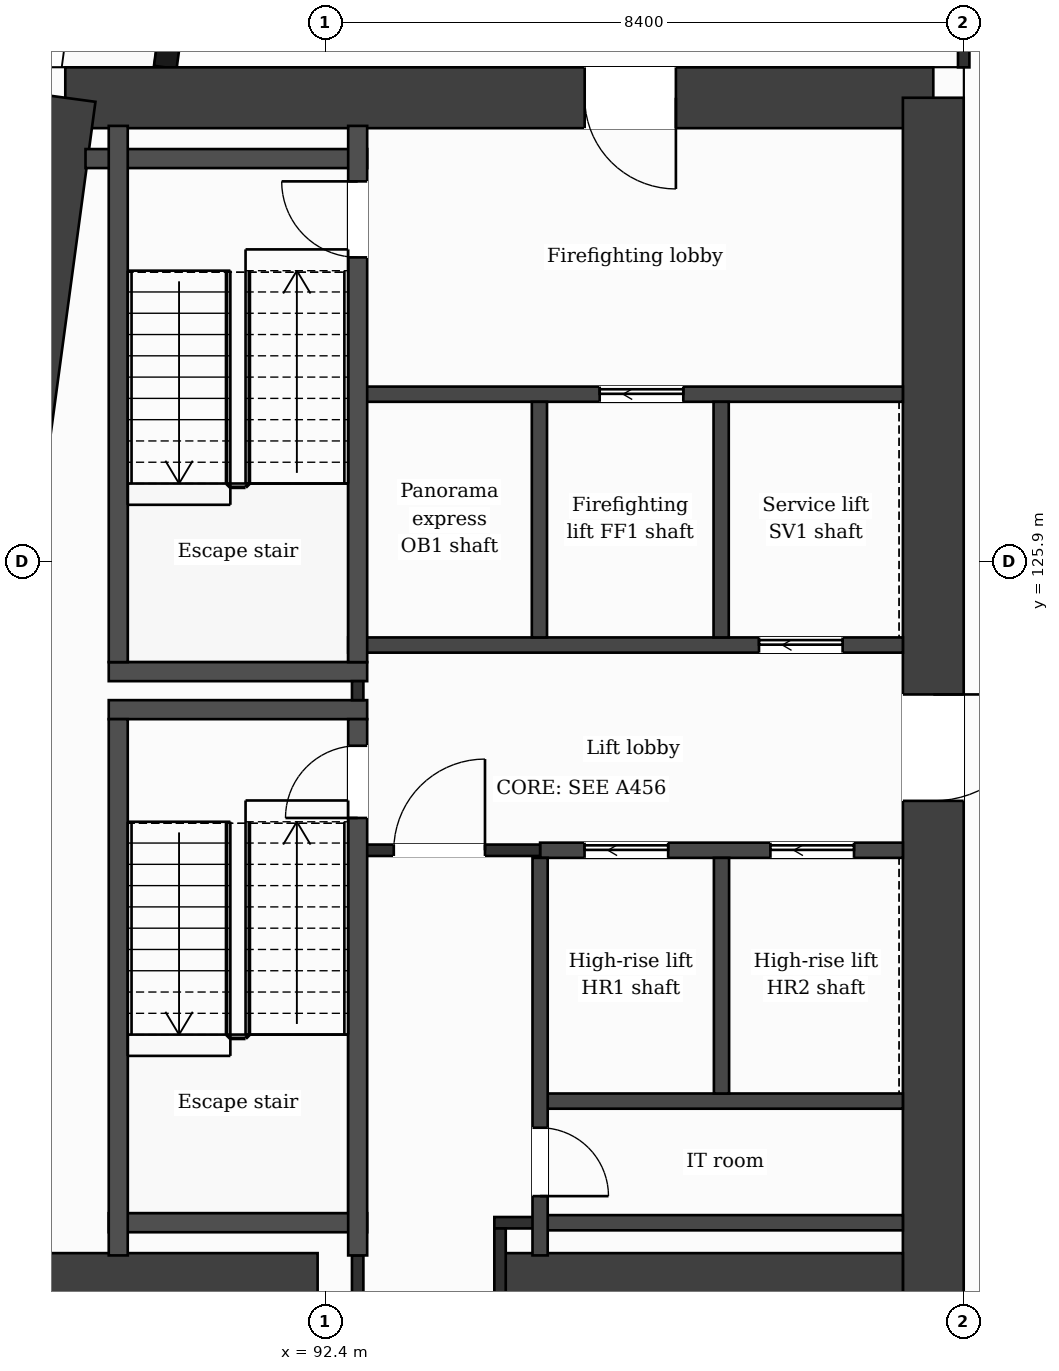
"""IFC4 building model, lengths in metres.
Left out: names, types, materials, properties, quantities, classifications, styles, units other than length and angle.
Written with IfcOpenShell. Run it as: python <this file> out.ifc"""

import sys

from ifc_helpers import new_model, si_unit, direction, frame, frame_2d, origin, place, context, subcontext, project, spatial, rectangle, extrude, element, fill, save


model = new_model("IFC4")
c1 = context("Model", 3, precision=1e-05, world=origin(), true_north=direction((0.0, 1.0)))
c2 = subcontext(c1, "Body", "Model", "MODEL_VIEW")
j1 = project(units=[si_unit("LENGTHUNIT", "METRE"), si_unit("PLANEANGLEUNIT", "RADIAN")], contexts=[c1])
p1 = place(None, origin())
s1 = spatial("IfcSite", under=j1, at=p1, CompositionType="ELEMENT")
p2 = place(p1, origin())
s2 = spatial("IfcBuilding", under=s1, at=p2, CompositionType="ELEMENT")
p3 = place(p2, frame((0.0, 0.0, 228.1)))
s3 = spatial("IfcBuildingStorey", under=s2, at=p3, CompositionType="ELEMENT", Elevation=228.1)
p4 = place(p3, frame((88.98, 132.0, 0.0), z_axis=(0.0, 0.0, 1.0), x_axis=(1.0, 0.0, 0.0)))
e1 = element("IfcWall", 1, at=p4, inside=s3, PredefinedType="SHEAR", context=c2, shape_type="SweptSolid", body=[
    extrude(rectangle(XDim=11.419, YDim=0.8, at=frame_2d((5.71, 0.0))), origin(), (0.0, 0.0, 1.0), 3.7),
])
p5 = place(p4, frame((6.833, 0.0, 0.0)))
e2 = element("IfcOpeningElement", 2, at=p5, cuts=e1, PredefinedType="OPENING", context=c2, shape_type="SweptSolid", body=[
    extrude(rectangle(XDim=1.2, YDim=2.1, at=frame_2d((0.6, 1.05))), frame((0.0, 0.41, 0.0), z_axis=(0.0, -1.0, 0.0), x_axis=(1.0, 0.0, 0.0)), (0.0, 0.0, 1.0), 0.82),
])
p6 = place(p3, frame((100.4, 132.0, 0.0), z_axis=(0.0, 0.0, 1.0), x_axis=(0.0, -1.0, 0.0)))
e3 = element("IfcWall", 3, at=p6, inside=s3, PredefinedType="SHEAR", context=c2, shape_type="SweptSolid", body=[
    extrude(rectangle(XDim=21.2, YDim=0.8, at=frame_2d((10.6, 0.0))), origin(), (0.0, 0.0, 1.0), 3.7),
])
p7 = place(p6, frame((7.85, 0.0, 0.0)))
e4 = element("IfcOpeningElement", 4, at=p7, cuts=e3, PredefinedType="OPENING", context=c2, shape_type="SweptSolid", body=[
    extrude(rectangle(XDim=1.4, YDim=2.1, at=frame_2d((0.7, 1.05))), frame((0.0, 0.41, 0.0), z_axis=(0.0, -1.0, 0.0), x_axis=(1.0, 0.0, 0.0)), (0.0, 0.0, 1.0), 0.82),
])
p8 = place(p3, frame((86.127, 110.8, 0.0), z_axis=(0.0, 0.0, 1.0), x_axis=(0.133408347329, 0.991061154956, 0.0)))
e5 = element("IfcWall", 5, at=p8, inside=s3, PredefinedType="SHEAR", context=c2, shape_type="SweptSolid", body=[
    extrude(rectangle(XDim=21.391, YDim=0.8, at=frame_2d((10.696, 0.0))), origin(), (0.0, 0.0, 1.0), 3.7),
])
p9 = place(p3, frame((87.223, 116.4, 0.0), z_axis=(0.0, 0.0, 1.0), x_axis=(1.0, 0.0, 0.0)))
e6 = element("IfcWall", 6, at=p9, inside=s3, PredefinedType="SHEAR", context=c2, shape_type="SweptSolid", body=[
    extrude(rectangle(XDim=5.077, YDim=0.8, at=frame_2d((2.539, 0.0))), origin(), (0.0, 0.0, 1.0), 3.7),
])
p10 = place(p3, frame((94.7, 116.4, 0.0), z_axis=(0.0, 0.0, 1.0), x_axis=(1.0, 0.0, 0.0)))
e7 = element("IfcWall", 7, at=p10, inside=s3, PredefinedType="SHEAR", context=c2, shape_type="SweptSolid", body=[
    extrude(rectangle(XDim=5.3, YDim=0.8, at=frame_2d((2.65, 0.0))), origin(), (0.0, 0.0, 1.0), 3.7),
])
p11 = place(p3, frame((91.177, 138.95, 0.0), z_axis=(0.0, 0.0, 1.0), x_axis=(-0.133426664613, -0.991058689065, 0.0)))
e8 = element("IfcWall", 8, at=p11, inside=s3, PredefinedType="SOLIDWALL", context=c2, shape_type="SweptSolid", body=[
    extrude(rectangle(XDim=6.609, YDim=0.3, at=frame_2d((3.305, 0.0))), origin(), (0.0, 0.0, 1.0), 3.38),
])
p12 = place(p11, frame((1.039, 0.0, 0.9)))
e9 = element("IfcOpeningElement", 9, at=p12, cuts=e8, PredefinedType="OPENING", context=c2, shape_type="SweptSolid", body=[
    extrude(rectangle(XDim=1.2, YDim=2.1, at=frame_2d((0.6, 1.05))), frame((0.0, 0.16, 0.0), z_axis=(0.0, -1.0, 0.0), x_axis=(1.0, 0.0, 0.0)), (0.0, 0.0, 1.0), 0.32),
])
p13 = place(p11, frame((4.294, 0.0, 0.0)))
e10 = element("IfcOpeningElement", 10, at=p13, cuts=e8, PredefinedType="OPENING", context=c2, shape_type="SweptSolid", body=[
    extrude(rectangle(XDim=1.2, YDim=2.4, at=frame_2d((0.6, 1.2))), frame((0.0, 0.16, 0.0), z_axis=(0.0, -1.0, 0.0), x_axis=(1.0, 0.0, 0.0)), (0.0, 0.0, 1.0), 0.32),
])
p14 = place(p3, frame((95.227, 117.2, 0.0), z_axis=(0.0, 0.0, 1.0), x_axis=(1.0, 0.0, 0.0)))
e11 = element("IfcWall", 11, at=p14, inside=s3, PredefinedType="PARTITIONING", context=c2, shape_type="SweptSolid", body=[
    extrude(rectangle(XDim=4.773, YDim=0.2, at=frame_2d((2.386, 0.0))), origin(), (0.0, 0.0, 1.0), 3.38),
])
p15 = place(p3, frame((94.625, 117.2, 0.0), z_axis=(0.0, 0.0, 1.0), x_axis=(1.0, 0.0, 0.0)))
e12 = element("IfcWall", 12, at=p15, inside=s3, PredefinedType="PARTITIONING", context=c2, shape_type="SweptSolid", body=[
    extrude(rectangle(XDim=0.602, YDim=0.15, at=frame_2d((0.301, 0.0))), origin(), (0.0, 0.0, 1.0), 3.38),
])
p16 = place(p3, frame((89.552, 117.2, 0.0), z_axis=(0.0, 0.0, 1.0), x_axis=(1.0, 0.0, 0.0)))
e13 = element("IfcWall", 13, at=p16, inside=s3, PredefinedType="PARTITIONING", context=c2, shape_type="SweptSolid", body=[
    extrude(rectangle(XDim=3.4, YDim=0.25, at=frame_2d((1.7, 0.0))), origin(), (0.0, 0.0, 1.0), 3.38),
])
p17 = place(p3, frame((95.227, 118.8, 0.0), z_axis=(0.0, 0.0, 1.0), x_axis=(1.0, 0.0, 0.0)))
e14 = element("IfcWall", 14, at=p17, inside=s3, PredefinedType="PARTITIONING", context=c2, shape_type="SweptSolid", body=[
    extrude(rectangle(XDim=4.773, YDim=0.2, at=frame_2d((2.386, 0.0))), origin(), (0.0, 0.0, 1.0), 3.38),
])
p18 = place(p3, frame((95.227, 122.1, 0.0), z_axis=(0.0, 0.0, 1.0), x_axis=(1.0, 0.0, 0.0)))
e15 = element("IfcWall", 15, at=p18, inside=s3, PredefinedType="PARTITIONING", context=c2, shape_type="SweptSolid", body=[
    extrude(rectangle(XDim=4.773, YDim=0.2, at=frame_2d((2.386, 0.0))), origin(), (0.0, 0.0, 1.0), 3.38),
])
p19 = place(p18, frame((0.585, 0.0, 0.0)))
e16 = element("IfcOpeningElement", 16, at=p19, cuts=e15, PredefinedType="OPENING", context=c2, shape_type="SweptSolid", body=[
    extrude(rectangle(XDim=1.1, YDim=2.1, at=frame_2d((0.55, 1.05))), frame((0.0, 0.11, 0.0), z_axis=(0.0, -1.0, 0.0), x_axis=(1.0, 0.0, 0.0)), (0.0, 0.0, 1.0), 0.22),
])
p20 = place(p18, frame((3.03, 0.0, 0.0)))
e17 = element("IfcOpeningElement", 17, at=p20, cuts=e15, PredefinedType="OPENING", context=c2, shape_type="SweptSolid", body=[
    extrude(rectangle(XDim=1.1, YDim=2.1, at=frame_2d((0.55, 1.05))), frame((0.0, 0.11, 0.0), z_axis=(0.0, -1.0, 0.0), x_axis=(1.0, 0.0, 0.0)), (0.0, 0.0, 1.0), 0.22),
])
p21 = place(p3, frame((92.827, 122.1, 0.0), z_axis=(0.0, 0.0, 1.0), x_axis=(1.0, 0.0, 0.0)))
e18 = element("IfcWall", 18, at=p21, inside=s3, PredefinedType="PARTITIONING", context=c2, shape_type="SweptSolid", body=[
    extrude(rectangle(XDim=2.4, YDim=0.15, at=frame_2d((1.2, 0.0))), origin(), (0.0, 0.0, 1.0), 3.38),
])
p22 = place(p21, frame((0.475, 0.0, 0.0)))
e19 = element("IfcOpeningElement", 19, at=p22, cuts=e18, PredefinedType="OPENING", context=c2, shape_type="SweptSolid", body=[
    extrude(rectangle(XDim=1.2, YDim=2.1, at=frame_2d((0.6, 1.05))), frame((0.0, 0.085, 0.0), z_axis=(0.0, -1.0, 0.0), x_axis=(1.0, 0.0, 0.0)), (0.0, 0.0, 1.0), 0.17),
])
for number, where, z_axis, x_axis in (
    (20, (89.552, 123.95, 0.0), (0.0, 0.0, 1.0), (1.0, 0.0, 0.0)),
    (21, (89.552, 124.45, 0.0), (0.0, 0.0, 1.0), (1.0, 0.0, 0.0)),
):
    element("IfcWall", number, at=place(p3, frame(where, z_axis=z_axis, x_axis=x_axis)), inside=s3, PredefinedType="PARTITIONING", context=c2, shape_type="SweptSolid", body=[
        extrude(rectangle(XDim=3.4, YDim=0.25, at=frame_2d((1.7, 0.0))), origin(), (0.0, 0.0, 1.0), 3.38),
    ])
p23 = place(p3, frame((92.702, 124.8, 0.0), z_axis=(0.0, 0.0, 1.0), x_axis=(1.0, 0.0, 0.0)))
e22 = element("IfcWall", 22, at=p23, inside=s3, PredefinedType="PARTITIONING", context=c2, shape_type="SweptSolid", body=[
    extrude(rectangle(XDim=7.298, YDim=0.2, at=frame_2d((3.649, 0.0))), origin(), (0.0, 0.0, 1.0), 3.38),
])
p24 = place(p23, frame((5.405, 0.0, 0.0)))
e23 = element("IfcOpeningElement", 23, at=p24, cuts=e22, PredefinedType="OPENING", context=c2, shape_type="SweptSolid", body=[
    extrude(rectangle(XDim=1.1, YDim=2.1, at=frame_2d((0.55, 1.05))), frame((0.0, 0.11, 0.0), z_axis=(0.0, -1.0, 0.0), x_axis=(1.0, 0.0, 0.0)), (0.0, 0.0, 1.0), 0.22),
])
p25 = place(p3, frame((92.827, 128.1, 0.0), z_axis=(0.0, 0.0, 1.0), x_axis=(1.0, 0.0, 0.0)))
e24 = element("IfcWall", 24, at=p25, inside=s3, PredefinedType="PARTITIONING", context=c2, shape_type="SweptSolid", body=[
    extrude(rectangle(XDim=7.173, YDim=0.2, at=frame_2d((3.586, 0.0))), origin(), (0.0, 0.0, 1.0), 3.38),
])
p26 = place(p25, frame((3.184, 0.0, 0.0)))
e25 = element("IfcOpeningElement", 25, at=p26, cuts=e24, PredefinedType="OPENING", context=c2, shape_type="SweptSolid", body=[
    extrude(rectangle(XDim=1.1, YDim=2.1, at=frame_2d((0.55, 1.05))), frame((0.0, 0.11, 0.0), z_axis=(0.0, -1.0, 0.0), x_axis=(1.0, 0.0, 0.0)), (0.0, 0.0, 1.0), 0.22),
])
p27 = place(p3, frame((89.246, 131.2, 0.0), z_axis=(0.0, 0.0, 1.0), x_axis=(1.0, 0.0, 0.0)))
e26 = element("IfcWall", 26, at=p27, inside=s3, PredefinedType="PARTITIONING", context=c2, shape_type="SweptSolid", body=[
    extrude(rectangle(XDim=3.706, YDim=0.25, at=frame_2d((1.853, 0.0))), origin(), (0.0, 0.0, 1.0), 3.38),
])
for number, where, z_axis, x_axis in (
    (27, (89.677, 116.77, 0.0), (0.0, 0.0, 1.0), (0.0, 1.0, 0.0)),
    (28, (89.677, 124.575, 0.0), (0.0, 0.0, 1.0), (0.0, 1.0, 0.0)),
):
    element("IfcWall", number, at=place(p3, frame(where, z_axis=z_axis, x_axis=x_axis)), inside=s3, PredefinedType="PARTITIONING", context=c2, shape_type="SweptSolid", body=[
        extrude(rectangle(XDim=7.055, YDim=0.25, at=frame_2d((3.527, 0.0))), origin(), (0.0, 0.0, 1.0), 3.38),
    ])
p28 = place(p3, frame((92.827, 116.0, 0.0), z_axis=(0.0, 0.0, 1.0), x_axis=(0.0, 1.0, 0.0)))
e29 = element("IfcWall", 29, at=p28, inside=s3, PredefinedType="PARTITIONING", context=c2, shape_type="SweptSolid", body=[
    extrude(rectangle(XDim=0.77, YDim=0.15, at=frame_2d((0.385, 0.0))), origin(), (0.0, 0.0, 1.0), 3.38),
])
p29 = place(p3, frame((92.827, 124.075, 0.0), z_axis=(0.0, 0.0, 1.0), x_axis=(0.0, 1.0, 0.0)))
e30 = element("IfcWall", 30, at=p29, inside=s3, PredefinedType="PARTITIONING", context=c2, shape_type="SweptSolid", body=[
    extrude(rectangle(XDim=0.25, YDim=0.15, at=frame_2d((0.125, 0.0))), origin(), (0.0, 0.0, 1.0), 3.38),
])
p30 = place(p3, frame((92.827, 116.77, 0.0), z_axis=(0.0, 0.0, 1.0), x_axis=(0.0, 1.0, 0.0)))
e31 = element("IfcWall", 31, at=p30, inside=s3, PredefinedType="PARTITIONING", context=c2, shape_type="SweptSolid", body=[
    extrude(rectangle(XDim=7.055, YDim=0.25, at=frame_2d((3.527, 0.0))), origin(), (0.0, 0.0, 1.0), 3.38),
])
p31 = place(p30, frame((5.755, 0.0, 0.0)))
e32 = element("IfcOpeningElement", 32, at=p31, cuts=e31, PredefinedType="OPENING", context=c2, shape_type="SweptSolid", body=[
    extrude(rectangle(XDim=0.95, YDim=2.1, at=frame_2d((0.475, 1.05))), frame((0.0, 0.135, 0.0), z_axis=(0.0, -1.0, 0.0), x_axis=(1.0, 0.0, 0.0)), (0.0, 0.0, 1.0), 0.27),
])
p32 = place(p3, frame((92.827, 124.575, 0.0), z_axis=(0.0, 0.0, 1.0), x_axis=(0.0, 1.0, 0.0)))
e33 = element("IfcWall", 33, at=p32, inside=s3, PredefinedType="PARTITIONING", context=c2, shape_type="SweptSolid", body=[
    extrude(rectangle(XDim=7.055, YDim=0.25, at=frame_2d((3.527, 0.0))), origin(), (0.0, 0.0, 1.0), 3.38),
])
p33 = place(p32, frame((5.325, 0.0, 0.0)))
e34 = element("IfcOpeningElement", 34, at=p33, cuts=e33, PredefinedType="OPENING", context=c2, shape_type="SweptSolid", body=[
    extrude(rectangle(XDim=1.0, YDim=2.1, at=frame_2d((0.5, 1.05))), frame((0.0, 0.135, 0.0), z_axis=(0.0, -1.0, 0.0), x_axis=(1.0, 0.0, 0.0)), (0.0, 0.0, 1.0), 0.27),
])
p34 = place(p3, frame((94.7, 116.0, 0.0), z_axis=(0.0, 0.0, 1.0), x_axis=(0.0, 1.0, 0.0)))
e35 = element("IfcWall", 35, at=p34, inside=s3, PredefinedType="PARTITIONING", context=c2, shape_type="SweptSolid", body=[
    extrude(rectangle(XDim=1.125, YDim=0.15, at=frame_2d((0.562, 0.0))), origin(), (0.0, 0.0, 1.0), 3.38),
])
p35 = place(p3, frame((95.218, 124.9, 0.0), z_axis=(0.0, 0.0, 1.0), x_axis=(0.0, 1.0, 0.0)))
e36 = element("IfcWall", 36, at=p35, inside=s3, PredefinedType="PARTITIONING", context=c2, shape_type="SweptSolid", body=[
    extrude(rectangle(XDim=3.1, YDim=0.2, at=frame_2d((1.55, 0.0))), origin(), (0.0, 0.0, 1.0), 3.38),
])
p36 = place(p3, frame((95.227, 116.77, 0.0), z_axis=(0.0, 0.0, 1.0), x_axis=(0.0, 1.0, 0.0)))
e37 = element("IfcWall", 37, at=p36, inside=s3, PredefinedType="PARTITIONING", context=c2, shape_type="SweptSolid", body=[
    extrude(rectangle(XDim=5.23, YDim=0.2, at=frame_2d((2.615, 0.0))), origin(), (0.0, 0.0, 1.0), 3.38),
])
p37 = place(p36, frame((0.78, 0.0, 0.0)))
e38 = element("IfcOpeningElement", 38, at=p37, cuts=e37, PredefinedType="OPENING", context=c2, shape_type="SweptSolid", body=[
    extrude(rectangle(XDim=0.9, YDim=2.1, at=frame_2d((0.45, 1.05))), frame((0.0, 0.11, 0.0), z_axis=(0.0, -1.0, 0.0), x_axis=(1.0, 0.0, 0.0)), (0.0, 0.0, 1.0), 0.22),
])
for number, where, z_axis, x_axis in (
    (39, (97.609, 124.9, 0.0), (0.0, 0.0, 1.0), (0.0, 1.0, 0.0)),
    (40, (97.614, 118.9, 0.0), (0.0, 0.0, 1.0), (0.0, 1.0, 0.0)),
):
    element("IfcWall", number, at=place(p3, frame(where, z_axis=z_axis, x_axis=x_axis)), inside=s3, PredefinedType="PARTITIONING", context=c2, shape_type="SweptSolid", body=[
        extrude(rectangle(XDim=3.1, YDim=0.2, at=frame_2d((1.55, 0.0))), origin(), (0.0, 0.0, 1.0), 3.38),
    ])
p38 = place(p3, frame((100.8, 132.4, 0.0), z_axis=(0.0, 0.0, 1.0), x_axis=(0.0, 1.0, 0.0)))
e41 = element("IfcWall", 41, at=p38, inside=s3, PredefinedType="PARTITIONING", context=c2, shape_type="SweptSolid", body=[
    extrude(rectangle(XDim=1.325, YDim=0.15, at=frame_2d((0.663, 0.0))), origin(), (0.0, 0.0, 1.0), 3.38),
])
p39 = place(p22, origin())
e42 = element("IfcDoor", 42, at=p39, inside=s3, OperationType="SINGLE_SWING_RIGHT", PredefinedType="DOOR", context=c2, shape_type="SweptSolid", body=[
    extrude(rectangle(XDim=1.2, YDim=2.1, at=frame_2d((0.6, 1.05))), frame((0.0, 0.025, 0.0), z_axis=(0.0, -1.0, 0.0), x_axis=(1.0, 0.0, 0.0)), (0.0, 0.0, 1.0), 0.05),
])
fill(e19, e42)
p40 = place(p19, origin())
e43 = element("IfcDoor", 43, at=p40, inside=s3, OperationType="SLIDING_TO_LEFT", PredefinedType="DOOR", context=c2, shape_type="SweptSolid", body=[
    extrude(rectangle(XDim=1.1, YDim=2.1, at=frame_2d((0.55, 1.05))), frame((0.0, 0.025, 0.0), z_axis=(0.0, -1.0, 0.0), x_axis=(1.0, 0.0, 0.0)), (0.0, 0.0, 1.0), 0.05),
])
fill(e16, e43)
p41 = place(p20, origin())
e44 = element("IfcDoor", 44, at=p41, inside=s3, OperationType="SLIDING_TO_LEFT", PredefinedType="DOOR", context=c2, shape_type="SweptSolid", body=[
    extrude(rectangle(XDim=1.1, YDim=2.1, at=frame_2d((0.55, 1.05))), frame((0.0, 0.025, 0.0), z_axis=(0.0, -1.0, 0.0), x_axis=(1.0, 0.0, 0.0)), (0.0, 0.0, 1.0), 0.05),
])
fill(e17, e44)
p42 = place(p26, origin())
e45 = element("IfcDoor", 45, at=p42, inside=s3, OperationType="SLIDING_TO_LEFT", PredefinedType="DOOR", context=c2, shape_type="SweptSolid", body=[
    extrude(rectangle(XDim=1.1, YDim=2.1, at=frame_2d((0.55, 1.05))), frame((0.0, 0.025, 0.0), z_axis=(0.0, -1.0, 0.0), x_axis=(1.0, 0.0, 0.0)), (0.0, 0.0, 1.0), 0.05),
])
fill(e25, e45)
p43 = place(p24, origin())
e46 = element("IfcDoor", 46, at=p43, inside=s3, OperationType="SLIDING_TO_LEFT", PredefinedType="DOOR", context=c2, shape_type="SweptSolid", body=[
    extrude(rectangle(XDim=1.1, YDim=2.1, at=frame_2d((0.55, 1.05))), frame((0.0, 0.025, 0.0), z_axis=(0.0, -1.0, 0.0), x_axis=(1.0, 0.0, 0.0)), (0.0, 0.0, 1.0), 0.05),
])
fill(e23, e46)
p44 = place(p31, origin())
e47 = element("IfcDoor", 47, at=p44, inside=s3, OperationType="SINGLE_SWING_LEFT", PredefinedType="DOOR", context=c2, shape_type="SweptSolid", body=[
    extrude(rectangle(XDim=0.95, YDim=2.1, at=frame_2d((0.475, 1.05))), frame((0.0, 0.025, 0.0), z_axis=(0.0, -1.0, 0.0), x_axis=(1.0, 0.0, 0.0)), (0.0, 0.0, 1.0), 0.05),
])
fill(e32, e47)
p45 = place(p33, origin())
e48 = element("IfcDoor", 48, at=p45, inside=s3, OperationType="SINGLE_SWING_RIGHT", PredefinedType="DOOR", context=c2, shape_type="SweptSolid", body=[
    extrude(rectangle(XDim=1.0, YDim=2.1, at=frame_2d((0.5, 1.05))), frame((0.0, 0.025, 0.0), z_axis=(0.0, -1.0, 0.0), x_axis=(1.0, 0.0, 0.0)), (0.0, 0.0, 1.0), 0.05),
])
fill(e34, e48)
p46 = place(p37, origin())
e49 = element("IfcDoor", 49, at=p46, inside=s3, OperationType="SINGLE_SWING_LEFT", PredefinedType="DOOR", context=c2, shape_type="SweptSolid", body=[
    extrude(rectangle(XDim=0.9, YDim=2.1, at=frame_2d((0.45, 1.05))), frame((0.0, 0.025, 0.0), z_axis=(0.0, -1.0, 0.0), x_axis=(1.0, 0.0, 0.0)), (0.0, 0.0, 1.0), 0.05),
])
fill(e38, e49)
p47 = place(p5, origin())
e50 = element("IfcDoor", 50, at=p47, inside=s3, OperationType="SINGLE_SWING_RIGHT", PredefinedType="DOOR", context=c2, shape_type="SweptSolid", body=[
    extrude(rectangle(XDim=1.2, YDim=2.1, at=frame_2d((0.6, 1.05))), frame((0.0, 0.025, 0.0), z_axis=(0.0, -1.0, 0.0), x_axis=(1.0, 0.0, 0.0)), (0.0, 0.0, 1.0), 0.05),
])
fill(e2, e50)
p48 = place(p7, origin())
e51 = element("IfcDoor", 51, at=p48, inside=s3, OperationType="SINGLE_SWING_LEFT", PredefinedType="DOOR", context=c2, shape_type="SweptSolid", body=[
    extrude(rectangle(XDim=1.4, YDim=2.1, at=frame_2d((0.7, 1.05))), frame((0.0, 0.025, 0.0), z_axis=(0.0, -1.0, 0.0), x_axis=(1.0, 0.0, 0.0)), (0.0, 0.0, 1.0), 0.05),
])
fill(e4, e51)
save(model, sys.argv[1])
